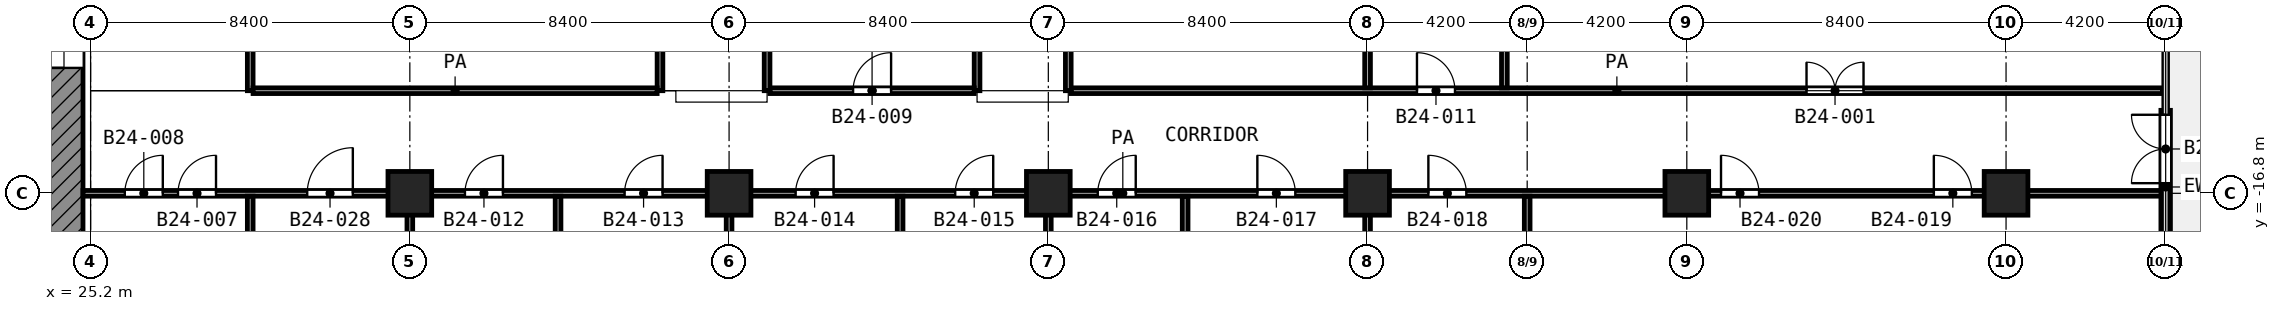
"""IFC4 building model, lengths in metres.
Left out: names, types, materials, properties, quantities, classifications, styles, units other than length and angle.
Written with IfcOpenShell. Run it as: python <this file> out.ifc"""

import sys

from ifc_helpers import new_model, si_unit, direction, frame, frame_2d, origin, origin_2d, place, context, subcontext, project, spatial, rectangle, extrude, element, fill, save


model = new_model("IFC4")
c1 = context("Model", 3, precision=1e-05, world=origin(), true_north=direction((0.0, 1.0)))
c2 = subcontext(c1, "Body", "Model", "MODEL_VIEW")
j1 = project(units=[si_unit("LENGTHUNIT", "METRE"), si_unit("PLANEANGLEUNIT", "RADIAN")], contexts=[c1])
p1 = place(None, origin())
s1 = spatial("IfcSite", under=j1, at=p1, CompositionType="ELEMENT")
p2 = place(p1, origin())
s2 = spatial("IfcBuilding", under=s1, at=p2, CompositionType="ELEMENT")
p3 = place(p2, frame((0.0, 0.0, 107.2)))
s3 = spatial("IfcBuildingStorey", under=s2, at=p3, CompositionType="ELEMENT", Elevation=107.2)
for number, where, z_axis, x_axis in (
    (1, (33.6, -16.8, 0.0), (0.0, 0.0, 1.0), (1.0, 0.0, 0.0)),
    (2, (42.0, -16.8, 0.0), (0.0, 0.0, 1.0), (1.0, 0.0, 0.0)),
    (3, (50.4, -16.8, 0.0), (0.0, 0.0, 1.0), (1.0, 0.0, 0.0)),
    (4, (58.8, -16.8, 0.0), (0.0, 0.0, 1.0), (1.0, 0.0, 0.0)),
    (5, (67.2, -16.8, 0.0), (0.0, 0.0, 1.0), (1.0, 0.0, 0.0)),
    (6, (75.6, -16.8, 0.0), (0.0, 0.0, 1.0), (1.0, 0.0, 0.0)),
):
    element("IfcColumn", number, at=place(p3, frame(where, z_axis=z_axis, x_axis=x_axis)), inside=s3, PredefinedType="COLUMN", context=c2, shape_type="SweptSolid", body=[
        extrude(rectangle(XDim=1.15, YDim=1.15, at=origin_2d()), origin(), (0.0, 0.0, 1.0), 4.2),
    ])
p4 = place(p3, frame((79.8, -18.65, 0.0), z_axis=(0.0, 0.0, 1.0), x_axis=(0.0, 1.0, 0.0)))
e7 = element("IfcWall", 7, at=p4, inside=s3, PredefinedType="SOLIDWALL", context=c2, shape_type="SweptSolid", body=[
    extrude(rectangle(XDim=4.033, YDim=0.25, at=frame_2d((2.017, 0.0))), origin(), (0.0, 0.0, 1.0), 3.48),
])
p5 = place(p4, frame((2.117, 0.0, 0.0)))
e8 = element("IfcOpeningElement", 8, at=p5, cuts=e7, PredefinedType="OPENING", context=c2, shape_type="SweptSolid", body=[
    extrude(rectangle(XDim=1.8, YDim=2.1, at=frame_2d((0.9, 1.05))), frame((0.0, 0.135, 0.0), z_axis=(0.0, -1.0, 0.0), x_axis=(1.0, 0.0, 0.0)), (0.0, 0.0, 1.0), 0.27),
])
p6 = place(p3, frame((24.5, -24.0, 0.0), z_axis=(0.0, 0.0, 1.0), x_axis=(0.0, 1.0, 0.0)))
e9 = element("IfcWall", 9, at=p6, inside=s3, PredefinedType="SHEAR", context=c2, shape_type="SweptSolid", body=[
    extrude(rectangle(XDim=18.6, YDim=1.0, at=frame_2d((9.3, 0.0))), origin(), (0.0, 0.0, 1.0), 3.6),
])
p7 = place(p6, frame((10.5, 0.0, 0.0)))
e10 = element("IfcOpeningElement", 10, at=p7, cuts=e9, PredefinedType="OPENING", context=c2, shape_type="SweptSolid", body=[
    extrude(rectangle(XDim=1.8, YDim=2.1, at=frame_2d((0.9, 1.05))), frame((0.0, 0.51, 0.0), z_axis=(0.0, -1.0, 0.0), x_axis=(1.0, 0.0, 0.0)), (0.0, 0.0, 1.0), 1.02),
])
p8 = place(p3, frame((25.0, -16.8, 0.0), z_axis=(0.0, 0.0, 1.0), x_axis=(1.0, 0.0, 0.0)))
e11 = element("IfcWall", 11, at=p8, inside=s3, PredefinedType="PARTITIONING", context=c2, shape_type="SweptSolid", body=[
    extrude(rectangle(XDim=54.72, YDim=0.15, at=frame_2d((27.36, 0.0))), origin(), (0.0, 0.0, 1.0), 3.6),
])
p9 = place(p8, frame((2.5, 0.0, 0.0)))
e12 = element("IfcOpeningElement", 12, at=p9, cuts=e11, PredefinedType="OPENING", context=c2, shape_type="SweptSolid", body=[
    extrude(rectangle(XDim=1.0, YDim=2.1, at=frame_2d((0.5, 1.05))), frame((0.0, 0.085, 0.0), z_axis=(0.0, -1.0, 0.0), x_axis=(1.0, 0.0, 0.0)), (0.0, 0.0, 1.0), 0.17),
])
p10 = place(p8, frame((1.1, 0.0, 0.0)))
e13 = element("IfcOpeningElement", 13, at=p10, cuts=e11, PredefinedType="OPENING", context=c2, shape_type="SweptSolid", body=[
    extrude(rectangle(XDim=1.0, YDim=2.1, at=frame_2d((0.5, 1.05))), frame((0.0, 0.085, 0.0), z_axis=(0.0, -1.0, 0.0), x_axis=(1.0, 0.0, 0.0)), (0.0, 0.0, 1.0), 0.17),
])
p11 = place(p8, frame((5.9, 0.0, 0.0)))
e14 = element("IfcOpeningElement", 14, at=p11, cuts=e11, PredefinedType="OPENING", context=c2, shape_type="SweptSolid", body=[
    extrude(rectangle(XDim=1.2, YDim=2.1, at=frame_2d((0.6, 1.05))), frame((0.0, 0.085, 0.0), z_axis=(0.0, -1.0, 0.0), x_axis=(1.0, 0.0, 0.0)), (0.0, 0.0, 1.0), 0.17),
])
p12 = place(p8, frame((10.05, 0.0, 0.0)))
e15 = element("IfcOpeningElement", 15, at=p12, cuts=e11, PredefinedType="OPENING", context=c2, shape_type="SweptSolid", body=[
    extrude(rectangle(XDim=1.0, YDim=2.1, at=frame_2d((0.5, 1.05))), frame((0.0, 0.085, 0.0), z_axis=(0.0, -1.0, 0.0), x_axis=(1.0, 0.0, 0.0)), (0.0, 0.0, 1.0), 0.17),
])
p13 = place(p8, frame((14.25, 0.0, 0.0)))
e16 = element("IfcOpeningElement", 16, at=p13, cuts=e11, PredefinedType="OPENING", context=c2, shape_type="SweptSolid", body=[
    extrude(rectangle(XDim=1.0, YDim=2.1, at=frame_2d((0.5, 1.05))), frame((0.0, 0.085, 0.0), z_axis=(0.0, -1.0, 0.0), x_axis=(1.0, 0.0, 0.0)), (0.0, 0.0, 1.0), 0.17),
])
p14 = place(p8, frame((18.75, 0.0, 0.0)))
e17 = element("IfcOpeningElement", 17, at=p14, cuts=e11, PredefinedType="OPENING", context=c2, shape_type="SweptSolid", body=[
    extrude(rectangle(XDim=1.0, YDim=2.1, at=frame_2d((0.5, 1.05))), frame((0.0, 0.085, 0.0), z_axis=(0.0, -1.0, 0.0), x_axis=(1.0, 0.0, 0.0)), (0.0, 0.0, 1.0), 0.17),
])
p15 = place(p8, frame((22.95, 0.0, 0.0)))
e18 = element("IfcOpeningElement", 18, at=p15, cuts=e11, PredefinedType="OPENING", context=c2, shape_type="SweptSolid", body=[
    extrude(rectangle(XDim=1.0, YDim=2.1, at=frame_2d((0.5, 1.05))), frame((0.0, 0.085, 0.0), z_axis=(0.0, -1.0, 0.0), x_axis=(1.0, 0.0, 0.0)), (0.0, 0.0, 1.0), 0.17),
])
p16 = place(p8, frame((26.7, 0.0, 0.0)))
e19 = element("IfcOpeningElement", 19, at=p16, cuts=e11, PredefinedType="OPENING", context=c2, shape_type="SweptSolid", body=[
    extrude(rectangle(XDim=1.0, YDim=2.1, at=frame_2d((0.5, 1.05))), frame((0.0, 0.085, 0.0), z_axis=(0.0, -1.0, 0.0), x_axis=(1.0, 0.0, 0.0)), (0.0, 0.0, 1.0), 0.17),
])
p17 = place(p8, frame((30.9, 0.0, 0.0)))
e20 = element("IfcOpeningElement", 20, at=p17, cuts=e11, PredefinedType="OPENING", context=c2, shape_type="SweptSolid", body=[
    extrude(rectangle(XDim=1.0, YDim=2.1, at=frame_2d((0.5, 1.05))), frame((0.0, 0.085, 0.0), z_axis=(0.0, -1.0, 0.0), x_axis=(1.0, 0.0, 0.0)), (0.0, 0.0, 1.0), 0.17),
])
p18 = place(p8, frame((35.4, 0.0, 0.0)))
e21 = element("IfcOpeningElement", 21, at=p18, cuts=e11, PredefinedType="OPENING", context=c2, shape_type="SweptSolid", body=[
    extrude(rectangle(XDim=1.0, YDim=2.1, at=frame_2d((0.5, 1.05))), frame((0.0, 0.085, 0.0), z_axis=(0.0, -1.0, 0.0), x_axis=(1.0, 0.0, 0.0)), (0.0, 0.0, 1.0), 0.17),
])
p19 = place(p8, frame((48.7, 0.0, 0.0)))
e22 = element("IfcOpeningElement", 22, at=p19, cuts=e11, PredefinedType="OPENING", context=c2, shape_type="SweptSolid", body=[
    extrude(rectangle(XDim=1.0, YDim=2.1, at=frame_2d((0.5, 1.05))), frame((0.0, 0.085, 0.0), z_axis=(0.0, -1.0, 0.0), x_axis=(1.0, 0.0, 0.0)), (0.0, 0.0, 1.0), 0.17),
])
p20 = place(p8, frame((43.1, 0.0, 0.0)))
e23 = element("IfcOpeningElement", 23, at=p20, cuts=e11, PredefinedType="OPENING", context=c2, shape_type="SweptSolid", body=[
    extrude(rectangle(XDim=1.0, YDim=2.1, at=frame_2d((0.5, 1.05))), frame((0.0, 0.085, 0.0), z_axis=(0.0, -1.0, 0.0), x_axis=(1.0, 0.0, 0.0)), (0.0, 0.0, 1.0), 0.17),
])
p21 = place(p3, frame((29.475, -14.1, 0.0), z_axis=(0.0, 0.0, 1.0), x_axis=(1.0, 0.0, 0.0)))
e24 = element("IfcWall", 24, at=p21, inside=s3, PredefinedType="PARTITIONING", context=c2, shape_type="SweptSolid", body=[
    extrude(rectangle(XDim=10.632, YDim=0.15, at=frame_2d((5.316, 0.0))), origin(), (0.0, 0.0, 1.0), 3.6),
])
p22 = place(p3, frame((43.075, -14.1, 0.0), z_axis=(0.0, 0.0, 1.0), x_axis=(1.0, 0.0, 0.0)))
e25 = element("IfcWall", 25, at=p22, inside=s3, PredefinedType="PARTITIONING", context=c2, shape_type="SweptSolid", body=[
    extrude(rectangle(XDim=5.375, YDim=0.15, at=frame_2d((2.688, 0.0))), origin(), (0.0, 0.0, 1.0), 3.6),
])
p23 = place(p22, frame((2.188, 0.0, 0.0)))
e26 = element("IfcOpeningElement", 26, at=p23, cuts=e25, PredefinedType="OPENING", context=c2, shape_type="SweptSolid", body=[
    extrude(rectangle(XDim=1.0, YDim=2.1, at=frame_2d((0.5, 1.05))), frame((0.0, 0.085, 0.0), z_axis=(0.0, -1.0, 0.0), x_axis=(1.0, 0.0, 0.0)), (0.0, 0.0, 1.0), 0.17),
])
p24 = place(p3, frame((51.0, -14.1, 0.0), z_axis=(0.0, 0.0, 1.0), x_axis=(1.0, 0.0, 0.0)))
e27 = element("IfcWall", 27, at=p24, inside=s3, PredefinedType="PARTITIONING", context=c2, shape_type="SweptSolid", body=[
    extrude(rectangle(XDim=28.72, YDim=0.15, at=frame_2d((14.36, 0.0))), origin(), (0.0, 0.0, 1.0), 3.6),
])
p25 = place(p24, frame((9.1, 0.0, 0.0)))
e28 = element("IfcOpeningElement", 28, at=p25, cuts=e27, PredefinedType="OPENING", context=c2, shape_type="SweptSolid", body=[
    extrude(rectangle(XDim=1.0, YDim=2.1, at=frame_2d((0.5, 1.05))), frame((0.0, 0.085, 0.0), z_axis=(0.0, -1.0, 0.0), x_axis=(1.0, 0.0, 0.0)), (0.0, 0.0, 1.0), 0.17),
])
p26 = place(p24, frame((19.35, 0.0, 0.0)))
e29 = element("IfcOpeningElement", 29, at=p26, cuts=e27, PredefinedType="OPENING", context=c2, shape_type="SweptSolid", body=[
    extrude(rectangle(XDim=1.5, YDim=2.1, at=frame_2d((0.75, 1.05))), frame((0.0, 0.085, 0.0), z_axis=(0.0, -1.0, 0.0), x_axis=(1.0, 0.0, 0.0)), (0.0, 0.0, 1.0), 0.17),
])
p27 = place(p3, frame((29.4, -25.2, 0.0), z_axis=(0.0, 0.0, 1.0), x_axis=(0.0, 1.0, 0.0)))
e30 = element("IfcWall", 30, at=p27, inside=s3, PredefinedType="PARTITIONING", context=c2, shape_type="SweptSolid", body=[
    extrude(rectangle(XDim=8.325, YDim=0.15, at=frame_2d((4.163, 0.0))), origin(), (0.0, 0.0, 1.0), 3.6),
])
p28 = place(p3, frame((29.4, -14.1, 0.0), z_axis=(0.0, 0.0, 1.0), x_axis=(0.0, 1.0, 0.0)))
e31 = element("IfcWall", 31, at=p28, inside=s3, PredefinedType="PARTITIONING", context=c2, shape_type="SweptSolid", body=[
    extrude(rectangle(XDim=14.098, YDim=0.15, at=frame_2d((7.049, 0.0))), origin(), (0.0, 0.0, 1.0), 3.6),
])
for number, where, z_axis, x_axis in (
    (32, (33.6, -25.12, 0.0), (0.0, 0.0, 1.0), (0.0, 1.0, 0.0)),
    (33, (37.5, -25.12, 0.0), (0.0, 0.0, 1.0), (0.0, 1.0, 0.0)),
):
    element("IfcWall", number, at=place(p3, frame(where, z_axis=z_axis, x_axis=x_axis)), inside=s3, PredefinedType="PARTITIONING", context=c2, shape_type="SweptSolid", body=[
        extrude(rectangle(XDim=8.245, YDim=0.15, at=frame_2d((4.123, 0.0))), origin(), (0.0, 0.0, 1.0), 2.7),
    ])
p29 = place(p3, frame((40.182, -14.1, 0.0), z_axis=(0.0, 0.0, 1.0), x_axis=(0.0, 1.0, 0.0)))
e34 = element("IfcWall", 34, at=p29, inside=s3, PredefinedType="PARTITIONING", context=c2, shape_type="SweptSolid", body=[
    extrude(rectangle(XDim=13.748, YDim=0.15, at=frame_2d((6.874, 0.0))), origin(), (0.0, 0.0, 1.0), 3.6),
])
p30 = place(p29, frame((3.633, 0.0, 0.0)))
e35 = element("IfcOpeningElement", 35, at=p30, cuts=e34, PredefinedType="OPENING", context=c2, shape_type="SweptSolid", body=[
    extrude(rectangle(XDim=1.5, YDim=2.1, at=frame_2d((0.75, 1.05))), frame((0.0, 0.085, 0.0), z_axis=(0.0, -1.0, 0.0), x_axis=(1.0, 0.0, 0.0)), (0.0, 0.0, 1.0), 0.17),
])
p31 = place(p29, frame((8.415, 0.0, 0.0)))
e36 = element("IfcOpeningElement", 36, at=p31, cuts=e34, PredefinedType="OPENING", context=c2, shape_type="SweptSolid", body=[
    extrude(rectangle(XDim=1.5, YDim=2.1, at=frame_2d((0.75, 1.05))), frame((0.0, 0.085, 0.0), z_axis=(0.0, -1.0, 0.0), x_axis=(1.0, 0.0, 0.0)), (0.0, 0.0, 1.0), 0.17),
])
p32 = place(p3, frame((42.0, -25.12, 0.0), z_axis=(0.0, 0.0, 1.0), x_axis=(0.0, 1.0, 0.0)))
e37 = element("IfcWall", 37, at=p32, inside=s3, PredefinedType="PARTITIONING", context=c2, shape_type="SweptSolid", body=[
    extrude(rectangle(XDim=8.245, YDim=0.15, at=frame_2d((4.123, 0.0))), origin(), (0.0, 0.0, 1.0), 3.6),
])
p33 = place(p3, frame((43.0, -14.1, 0.0), z_axis=(0.0, 0.0, 1.0), x_axis=(0.0, 1.0, 0.0)))
e38 = element("IfcWall", 38, at=p33, inside=s3, PredefinedType="PARTITIONING", context=c2, shape_type="SweptSolid", body=[
    extrude(rectangle(XDim=5.125, YDim=0.15, at=frame_2d((2.562, 0.0))), origin(), (0.0, 0.0, 1.0), 3.6),
])
p34 = place(p3, frame((46.5, -25.12, 0.0), z_axis=(0.0, 0.0, 1.0), x_axis=(0.0, 1.0, 0.0)))
e39 = element("IfcWall", 39, at=p34, inside=s3, PredefinedType="PARTITIONING", context=c2, shape_type="SweptSolid", body=[
    extrude(rectangle(XDim=8.245, YDim=0.15, at=frame_2d((4.123, 0.0))), origin(), (0.0, 0.0, 1.0), 2.7),
])
p35 = place(p3, frame((48.525, -14.1, 0.0), z_axis=(0.0, 0.0, 1.0), x_axis=(0.0, 1.0, 0.0)))
e40 = element("IfcWall", 40, at=p35, inside=s3, PredefinedType="PARTITIONING", context=c2, shape_type="SweptSolid", body=[
    extrude(rectangle(XDim=5.45, YDim=0.15, at=frame_2d((2.725, 0.0))), origin(), (0.0, 0.0, 1.0), 3.6),
])
p36 = place(p3, frame((50.4, -25.12, 0.0), z_axis=(0.0, 0.0, 1.0), x_axis=(0.0, 1.0, 0.0)))
e41 = element("IfcWall", 41, at=p36, inside=s3, PredefinedType="PARTITIONING", context=c2, shape_type="SweptSolid", body=[
    extrude(rectangle(XDim=8.245, YDim=0.15, at=frame_2d((4.123, 0.0))), origin(), (0.0, 0.0, 1.0), 3.6),
])
p37 = place(p3, frame((50.925, -14.1, 0.0), z_axis=(0.0, 0.0, 1.0), x_axis=(0.0, 1.0, 0.0)))
e42 = element("IfcWall", 42, at=p37, inside=s3, PredefinedType="PARTITIONING", context=c2, shape_type="SweptSolid", body=[
    extrude(rectangle(XDim=12.25, YDim=0.15, at=frame_2d((6.125, 0.0))), origin(), (0.0, 0.0, 1.0), 3.6),
])
p38 = place(p37, frame((6.325, 0.0, 0.0)))
e43 = element("IfcOpeningElement", 43, at=p38, cuts=e42, PredefinedType="OPENING", context=c2, shape_type="SweptSolid", body=[
    extrude(rectangle(XDim=1.0, YDim=2.1, at=frame_2d((0.5, 1.05))), frame((0.0, 0.085, 0.0), z_axis=(0.0, -1.0, 0.0), x_axis=(1.0, 0.0, 0.0)), (0.0, 0.0, 1.0), 0.17),
])
p39 = place(p3, frame((54.0, -25.12, 0.0), z_axis=(0.0, 0.0, 1.0), x_axis=(0.0, 1.0, 0.0)))
e44 = element("IfcWall", 44, at=p39, inside=s3, PredefinedType="PARTITIONING", context=c2, shape_type="SweptSolid", body=[
    extrude(rectangle(XDim=8.245, YDim=0.15, at=frame_2d((4.123, 0.0))), origin(), (0.0, 0.0, 1.0), 2.7),
])
p40 = place(p3, frame((58.8, -25.12, 0.0), z_axis=(0.0, 0.0, 1.0), x_axis=(0.0, 1.0, 0.0)))
e45 = element("IfcWall", 45, at=p40, inside=s3, PredefinedType="PARTITIONING", context=c2, shape_type="SweptSolid", body=[
    extrude(rectangle(XDim=8.245, YDim=0.15, at=frame_2d((4.123, 0.0))), origin(), (0.0, 0.0, 1.0), 3.6),
])
for number, where, z_axis, x_axis in (
    (46, (58.8, -14.025, 0.0), (0.0, 0.0, 1.0), (0.0, 1.0, 0.0)),
    (47, (62.4, -14.025, 0.0), (0.0, 0.0, 1.0), (0.0, 1.0, 0.0)),
):
    element("IfcWall", number, at=place(p3, frame(where, z_axis=z_axis, x_axis=x_axis)), inside=s3, PredefinedType="PARTITIONING", context=c2, shape_type="SweptSolid", body=[
        extrude(rectangle(XDim=14.023, YDim=0.15, at=frame_2d((7.011, 0.0))), origin(), (0.0, 0.0, 1.0), 3.6),
    ])
p41 = place(p3, frame((63.0, -25.12, 0.0), z_axis=(0.0, 0.0, 1.0), x_axis=(0.0, 1.0, 0.0)))
e48 = element("IfcWall", 48, at=p41, inside=s3, PredefinedType="PARTITIONING", context=c2, shape_type="SweptSolid", body=[
    extrude(rectangle(XDim=8.245, YDim=0.15, at=frame_2d((4.123, 0.0))), origin(), (0.0, 0.0, 1.0), 3.6),
])
p42 = place(p5, origin())
e49 = element("IfcDoor", 49, at=p42, inside=s3, OperationType="DOUBLE_DOOR_SINGLE_SWING", PredefinedType="DOOR", context=c2, shape_type="SweptSolid", body=[
    extrude(rectangle(XDim=1.8, YDim=2.1, at=frame_2d((0.9, 1.05))), frame((0.0, 0.025, 0.0), z_axis=(0.0, -1.0, 0.0), x_axis=(1.0, 0.0, 0.0)), (0.0, 0.0, 1.0), 0.05),
])
fill(e8, e49)
p43 = place(p7, origin())
e50 = element("IfcDoor", 50, at=p43, inside=s3, OperationType="DOUBLE_DOOR_SINGLE_SWING", PredefinedType="DOOR", context=c2, shape_type="SweptSolid", body=[
    extrude(rectangle(XDim=1.8, YDim=2.1, at=frame_2d((0.9, 1.05))), frame((0.0, 0.025, 0.0), z_axis=(0.0, -1.0, 0.0), x_axis=(1.0, 0.0, 0.0)), (0.0, 0.0, 1.0), 0.05),
])
fill(e10, e50)
p44 = place(p9, origin())
e51 = element("IfcDoor", 51, at=p44, inside=s3, OperationType="SINGLE_SWING_RIGHT", PredefinedType="DOOR", context=c2, shape_type="SweptSolid", body=[
    extrude(rectangle(XDim=1.0, YDim=2.1, at=frame_2d((0.5, 1.05))), frame((0.0, 0.025, 0.0), z_axis=(0.0, -1.0, 0.0), x_axis=(1.0, 0.0, 0.0)), (0.0, 0.0, 1.0), 0.05),
])
fill(e12, e51)
p45 = place(p10, origin())
e52 = element("IfcDoor", 52, at=p45, inside=s3, OperationType="SINGLE_SWING_RIGHT", PredefinedType="DOOR", context=c2, shape_type="SweptSolid", body=[
    extrude(rectangle(XDim=1.0, YDim=2.1, at=frame_2d((0.5, 1.05))), frame((0.0, 0.025, 0.0), z_axis=(0.0, -1.0, 0.0), x_axis=(1.0, 0.0, 0.0)), (0.0, 0.0, 1.0), 0.05),
])
fill(e13, e52)
p46 = place(p23, origin())
e53 = element("IfcDoor", 53, at=p46, inside=s3, OperationType="SINGLE_SWING_RIGHT", PredefinedType="DOOR", context=c2, shape_type="SweptSolid", body=[
    extrude(rectangle(XDim=1.0, YDim=2.1, at=frame_2d((0.5, 1.05))), frame((0.0, 0.025, 0.0), z_axis=(0.0, -1.0, 0.0), x_axis=(1.0, 0.0, 0.0)), (0.0, 0.0, 1.0), 0.05),
])
fill(e26, e53)
p47 = place(p25, origin())
e54 = element("IfcDoor", 54, at=p47, inside=s3, OperationType="SINGLE_SWING_LEFT", PredefinedType="DOOR", context=c2, shape_type="SweptSolid", body=[
    extrude(rectangle(XDim=1.0, YDim=2.1, at=frame_2d((0.5, 1.05))), frame((0.0, 0.025, 0.0), z_axis=(0.0, -1.0, 0.0), x_axis=(1.0, 0.0, 0.0)), (0.0, 0.0, 1.0), 0.05),
])
fill(e28, e54)
p48 = place(p26, origin())
e55 = element("IfcDoor", 55, at=p48, inside=s3, OperationType="DOUBLE_DOOR_SINGLE_SWING", PredefinedType="DOOR", context=c2, shape_type="SweptSolid", body=[
    extrude(rectangle(XDim=1.5, YDim=2.1, at=frame_2d((0.75, 1.05))), frame((0.0, 0.025, 0.0), z_axis=(0.0, -1.0, 0.0), x_axis=(1.0, 0.0, 0.0)), (0.0, 0.0, 1.0), 0.05),
])
fill(e29, e55)
p49 = place(p11, origin())
e56 = element("IfcDoor", 56, at=p49, inside=s3, OperationType="SINGLE_SWING_RIGHT", PredefinedType="DOOR", context=c2, shape_type="SweptSolid", body=[
    extrude(rectangle(XDim=1.2, YDim=2.1, at=frame_2d((0.6, 1.05))), frame((0.0, 0.025, 0.0), z_axis=(0.0, -1.0, 0.0), x_axis=(1.0, 0.0, 0.0)), (0.0, 0.0, 1.0), 0.05),
])
fill(e14, e56)
p50 = place(p12, origin())
e57 = element("IfcDoor", 57, at=p50, inside=s3, OperationType="SINGLE_SWING_RIGHT", PredefinedType="DOOR", context=c2, shape_type="SweptSolid", body=[
    extrude(rectangle(XDim=1.0, YDim=2.1, at=frame_2d((0.5, 1.05))), frame((0.0, 0.025, 0.0), z_axis=(0.0, -1.0, 0.0), x_axis=(1.0, 0.0, 0.0)), (0.0, 0.0, 1.0), 0.05),
])
fill(e15, e57)
p51 = place(p13, origin())
e58 = element("IfcDoor", 58, at=p51, inside=s3, OperationType="SINGLE_SWING_RIGHT", PredefinedType="DOOR", context=c2, shape_type="SweptSolid", body=[
    extrude(rectangle(XDim=1.0, YDim=2.1, at=frame_2d((0.5, 1.05))), frame((0.0, 0.025, 0.0), z_axis=(0.0, -1.0, 0.0), x_axis=(1.0, 0.0, 0.0)), (0.0, 0.0, 1.0), 0.05),
])
fill(e16, e58)
p52 = place(p14, origin())
e59 = element("IfcDoor", 59, at=p52, inside=s3, OperationType="SINGLE_SWING_RIGHT", PredefinedType="DOOR", context=c2, shape_type="SweptSolid", body=[
    extrude(rectangle(XDim=1.0, YDim=2.1, at=frame_2d((0.5, 1.05))), frame((0.0, 0.025, 0.0), z_axis=(0.0, -1.0, 0.0), x_axis=(1.0, 0.0, 0.0)), (0.0, 0.0, 1.0), 0.05),
])
fill(e17, e59)
p53 = place(p15, origin())
e60 = element("IfcDoor", 60, at=p53, inside=s3, OperationType="SINGLE_SWING_RIGHT", PredefinedType="DOOR", context=c2, shape_type="SweptSolid", body=[
    extrude(rectangle(XDim=1.0, YDim=2.1, at=frame_2d((0.5, 1.05))), frame((0.0, 0.025, 0.0), z_axis=(0.0, -1.0, 0.0), x_axis=(1.0, 0.0, 0.0)), (0.0, 0.0, 1.0), 0.05),
])
fill(e18, e60)
p54 = place(p16, origin())
e61 = element("IfcDoor", 61, at=p54, inside=s3, OperationType="SINGLE_SWING_RIGHT", PredefinedType="DOOR", context=c2, shape_type="SweptSolid", body=[
    extrude(rectangle(XDim=1.0, YDim=2.1, at=frame_2d((0.5, 1.05))), frame((0.0, 0.025, 0.0), z_axis=(0.0, -1.0, 0.0), x_axis=(1.0, 0.0, 0.0)), (0.0, 0.0, 1.0), 0.05),
])
fill(e19, e61)
p55 = place(p17, origin())
e62 = element("IfcDoor", 62, at=p55, inside=s3, OperationType="SINGLE_SWING_LEFT", PredefinedType="DOOR", context=c2, shape_type="SweptSolid", body=[
    extrude(rectangle(XDim=1.0, YDim=2.1, at=frame_2d((0.5, 1.05))), frame((0.0, 0.025, 0.0), z_axis=(0.0, -1.0, 0.0), x_axis=(1.0, 0.0, 0.0)), (0.0, 0.0, 1.0), 0.05),
])
fill(e20, e62)
p56 = place(p18, origin())
e63 = element("IfcDoor", 63, at=p56, inside=s3, OperationType="SINGLE_SWING_LEFT", PredefinedType="DOOR", context=c2, shape_type="SweptSolid", body=[
    extrude(rectangle(XDim=1.0, YDim=2.1, at=frame_2d((0.5, 1.05))), frame((0.0, 0.025, 0.0), z_axis=(0.0, -1.0, 0.0), x_axis=(1.0, 0.0, 0.0)), (0.0, 0.0, 1.0), 0.05),
])
fill(e21, e63)
p57 = place(p19, origin())
e64 = element("IfcDoor", 64, at=p57, inside=s3, OperationType="SINGLE_SWING_LEFT", PredefinedType="DOOR", context=c2, shape_type="SweptSolid", body=[
    extrude(rectangle(XDim=1.0, YDim=2.1, at=frame_2d((0.5, 1.05))), frame((0.0, 0.025, 0.0), z_axis=(0.0, -1.0, 0.0), x_axis=(1.0, 0.0, 0.0)), (0.0, 0.0, 1.0), 0.05),
])
fill(e22, e64)
p58 = place(p20, origin())
e65 = element("IfcDoor", 65, at=p58, inside=s3, OperationType="SINGLE_SWING_LEFT", PredefinedType="DOOR", context=c2, shape_type="SweptSolid", body=[
    extrude(rectangle(XDim=1.0, YDim=2.1, at=frame_2d((0.5, 1.05))), frame((0.0, 0.025, 0.0), z_axis=(0.0, -1.0, 0.0), x_axis=(1.0, 0.0, 0.0)), (0.0, 0.0, 1.0), 0.05),
])
fill(e23, e65)
save(model, sys.argv[1])
